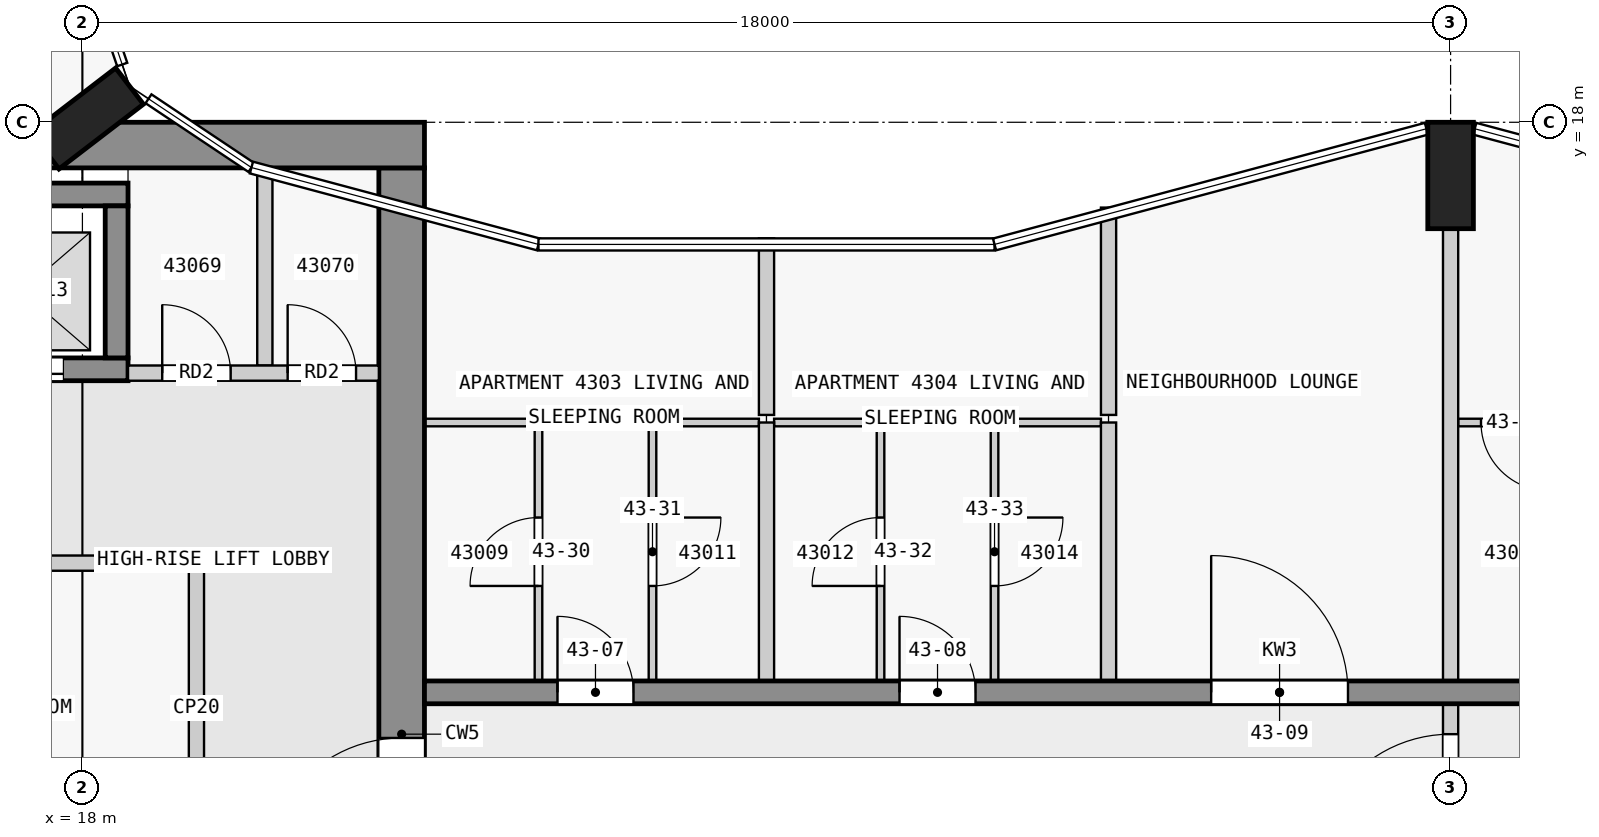
"""IFC4 building model, lengths in metres.
Left out: names, types, materials, properties, quantities, classifications, styles, units other than length and angle.
Written with IfcOpenShell. Run it as: python <this file> out.ifc"""

import sys

from ifc_helpers import new_model, si_unit, direction, frame, frame_2d, origin, origin_2d, place, context, subcontext, project, spatial, rectangle, extrude, element, fill, save


model = new_model("IFC4")
c1 = context("Model", 3, precision=1e-05, world=origin(), true_north=direction((0.0, 1.0)))
c2 = subcontext(c1, "Body", "Model", "MODEL_VIEW")
j1 = project(units=[si_unit("LENGTHUNIT", "METRE"), si_unit("PLANEANGLEUNIT", "RADIAN")], contexts=[c1])
p1 = place(None, origin())
s1 = spatial("IfcSite", under=j1, at=p1, CompositionType="ELEMENT")
p2 = place(p1, origin())
s2 = spatial("IfcBuilding", under=s1, at=p2, CompositionType="ELEMENT")
p3 = place(p2, frame((0.0, 0.0, 167.4)))
s3 = spatial("IfcBuildingStorey", under=s2, at=p3, CompositionType="ELEMENT", Elevation=167.4)
for number, where, z_axis, x_axis in (
    (1, (36.0, 17.3, 0.0), (0.0, 0.0, 1.0), (1.0, 0.0, 0.0)),
    (2, (18.065, 18.05, 0.0), (0.0, 0.0, 1.0), (-0.609, 0.793, 0.0)),
):
    element("IfcColumn", number, at=place(p3, frame(where, z_axis=z_axis, x_axis=x_axis)), inside=s3, PredefinedType="COLUMN", context=c2, shape_type="SweptSolid", body=[
        extrude(rectangle(XDim=0.6, YDim=1.4, at=origin_2d()), origin(), (0.0, 0.0, 1.0), 3.5),
    ])
p4 = place(p3, frame((1.38, 17.7, 0.0), z_axis=(0.0, 0.0, 1.0), x_axis=(1.0, 0.0, 0.0)))
e3 = element("IfcWall", 3, at=p4, inside=s3, PredefinedType="SHEAR", context=c2, shape_type="SweptSolid", body=[
    extrude(rectangle(XDim=21.12, YDim=0.6, at=frame_2d((10.56, 0.0))), origin(), (0.0, 0.0, 1.0), 3.25),
])
p5 = place(p4, frame((6.4, 0.0, 0.0)))
e4 = element("IfcOpeningElement", 4, at=p5, cuts=e3, PredefinedType="OPENING", context=c2, shape_type="SweptSolid", body=[
    extrude(rectangle(XDim=1.8, YDim=2.1, at=frame_2d((0.9, 1.05))), frame((0.0, 0.31, 0.0), z_axis=(0.0, -1.0, 0.0), x_axis=(1.0, 0.0, 0.0)), (0.0, 0.0, 1.0), 0.62),
])
p6 = place(p3, frame((22.2, 2.5, 0.0), z_axis=(0.0, 0.0, 1.0), x_axis=(0.0, 1.0, 0.0)))
e5 = element("IfcWall", 5, at=p6, inside=s3, PredefinedType="SHEAR", context=c2, shape_type="SweptSolid", body=[
    extrude(rectangle(XDim=14.9, YDim=0.6, at=frame_2d((7.45, 0.0))), origin(), (0.0, 0.0, 1.0), 3.25),
])
p7 = place(p6, frame((5.6, 0.0, 0.0)))
e6 = element("IfcOpeningElement", 6, at=p7, cuts=e5, PredefinedType="OPENING", context=c2, shape_type="SweptSolid", body=[
    extrude(rectangle(XDim=1.8, YDim=2.1, at=frame_2d((0.9, 1.05))), frame((0.0, 0.31, 0.0), z_axis=(0.0, -1.0, 0.0), x_axis=(1.0, 0.0, 0.0)), (0.0, 0.0, 1.0), 0.62),
])
p8 = place(p3, frame((10.8, 17.05, 0.0), z_axis=(0.0, 0.0, 1.0), x_axis=(1.0, 0.0, 0.0)))
e7 = element("IfcWall", 7, at=p8, inside=s3, PredefinedType="SHEAR", context=c2, shape_type="SweptSolid", body=[
    extrude(rectangle(XDim=7.8, YDim=0.3, at=frame_2d((3.9, 0.0))), origin(), (0.0, 0.0, 1.0), 3.25),
])
p9 = place(p3, frame((10.8, 14.75, 0.0), z_axis=(0.0, 0.0, 1.0), x_axis=(1.0, 0.0, 0.0)))
e8 = element("IfcWall", 8, at=p9, inside=s3, PredefinedType="SHEAR", context=c2, shape_type="SweptSolid", body=[
    extrude(rectangle(XDim=7.8, YDim=0.3, at=frame_2d((3.9, 0.0))), origin(), (0.0, 0.0, 1.0), 3.25),
])
p10 = place(p9, frame((0.85, 0.0, 0.0)))
e9 = element("IfcOpeningElement", 9, at=p10, cuts=e8, PredefinedType="OPENING", context=c2, shape_type="SweptSolid", body=[
    extrude(rectangle(XDim=1.1, YDim=2.1, at=frame_2d((0.55, 1.05))), frame((0.0, 0.16, 0.0), z_axis=(0.0, -1.0, 0.0), x_axis=(1.0, 0.0, 0.0)), (0.0, 0.0, 1.0), 0.32),
])
p11 = place(p9, frame((3.35, 0.0, 0.0)))
e10 = element("IfcOpeningElement", 10, at=p11, cuts=e8, PredefinedType="OPENING", context=c2, shape_type="SweptSolid", body=[
    extrude(rectangle(XDim=1.1, YDim=2.1, at=frame_2d((0.55, 1.05))), frame((0.0, 0.16, 0.0), z_axis=(0.0, -1.0, 0.0), x_axis=(1.0, 0.0, 0.0)), (0.0, 0.0, 1.0), 0.32),
])
p12 = place(p9, frame((5.85, 0.0, 0.0)))
e11 = element("IfcOpeningElement", 11, at=p12, cuts=e8, PredefinedType="OPENING", context=c2, shape_type="SweptSolid", body=[
    extrude(rectangle(XDim=1.1, YDim=2.1, at=frame_2d((0.55, 1.05))), frame((0.0, 0.16, 0.0), z_axis=(0.0, -1.0, 0.0), x_axis=(1.0, 0.0, 0.0)), (0.0, 0.0, 1.0), 0.32),
])
p13 = place(p3, frame((18.45, 14.9, 0.0), z_axis=(0.0, 0.0, 1.0), x_axis=(0.0, 1.0, 0.0)))
e12 = element("IfcWall", 12, at=p13, inside=s3, PredefinedType="SHEAR", context=c2, shape_type="SweptSolid", body=[
    extrude(rectangle(XDim=2.0, YDim=0.3, at=frame_2d((1.0, 0.0))), origin(), (0.0, 0.0, 1.0), 3.25),
])
p14 = place(p3, frame((22.5, 10.5, 0.0), z_axis=(0.0, 0.0, 1.0), x_axis=(1.0, 0.0, 0.0)))
e13 = element("IfcWall", 13, at=p14, inside=s3, PredefinedType="SHEAR", context=c2, shape_type="SweptSolid", body=[
    extrude(rectangle(XDim=22.5, YDim=0.3, at=frame_2d((11.25, 0.0))), origin(), (0.0, 0.0, 1.0), 3.25),
])
p15 = place(p14, frame((1.75, 0.0, 0.0)))
e14 = element("IfcOpeningElement", 14, at=p15, cuts=e13, PredefinedType="OPENING", context=c2, shape_type="SweptSolid", body=[
    extrude(rectangle(XDim=1.0, YDim=2.1, at=frame_2d((0.5, 1.05))), frame((0.0, 0.16, 0.0), z_axis=(0.0, -1.0, 0.0), x_axis=(1.0, 0.0, 0.0)), (0.0, 0.0, 1.0), 0.32),
])
p16 = place(p14, frame((6.25, 0.0, 0.0)))
e15 = element("IfcOpeningElement", 15, at=p16, cuts=e13, PredefinedType="OPENING", context=c2, shape_type="SweptSolid", body=[
    extrude(rectangle(XDim=1.0, YDim=2.1, at=frame_2d((0.5, 1.05))), frame((0.0, 0.16, 0.0), z_axis=(0.0, -1.0, 0.0), x_axis=(1.0, 0.0, 0.0)), (0.0, 0.0, 1.0), 0.32),
])
p17 = place(p14, frame((10.35, 0.0, 0.0)))
e16 = element("IfcOpeningElement", 16, at=p17, cuts=e13, PredefinedType="OPENING", context=c2, shape_type="SweptSolid", body=[
    extrude(rectangle(XDim=1.8, YDim=2.1, at=frame_2d((0.9, 1.05))), frame((0.0, 0.16, 0.0), z_axis=(0.0, -1.0, 0.0), x_axis=(1.0, 0.0, 0.0)), (0.0, 0.0, 1.0), 0.32),
])
p18 = place(p14, frame((16.85, 0.0, 0.0)))
e17 = element("IfcOpeningElement", 17, at=p18, cuts=e13, PredefinedType="OPENING", context=c2, shape_type="SweptSolid", body=[
    extrude(rectangle(XDim=1.0, YDim=2.1, at=frame_2d((0.5, 1.05))), frame((0.0, 0.16, 0.0), z_axis=(0.0, -1.0, 0.0), x_axis=(1.0, 0.0, 0.0)), (0.0, 0.0, 1.0), 0.32),
])
p19 = place(p3, frame((19.5, 8.4, 0.0), z_axis=(0.0, 0.0, 1.0), x_axis=(0.0, 1.0, 0.0)))
e18 = element("IfcWall", 18, at=p19, inside=s3, PredefinedType="PARTITIONING", context=c2, shape_type="SweptSolid", body=[
    extrude(rectangle(XDim=3.8, YDim=0.2, at=frame_2d((1.9, 0.0))), origin(), (0.0, 0.0, 1.0), 3.25),
])
p20 = place(p3, frame((10.9, 12.2, 0.0), z_axis=(0.0, 0.0, 1.0), x_axis=(1.0, 0.0, 0.0)))
e19 = element("IfcWall", 19, at=p20, inside=s3, PredefinedType="PARTITIONING", context=c2, shape_type="SweptSolid", body=[
    extrude(rectangle(XDim=8.5, YDim=0.2, at=frame_2d((4.25, 0.0))), origin(), (0.0, 0.0, 1.0), 3.25),
])
p21 = place(p20, frame((1.4, 0.0, 0.0)))
e20 = element("IfcOpeningElement", 20, at=p21, cuts=e19, PredefinedType="OPENING", context=c2, shape_type="SweptSolid", body=[
    extrude(rectangle(XDim=0.9, YDim=2.1, at=frame_2d((0.45, 1.05))), frame((0.0, 0.11, 0.0), z_axis=(0.0, -1.0, 0.0), x_axis=(1.0, 0.0, 0.0)), (0.0, 0.0, 1.0), 0.22),
])
p22 = place(p20, frame((5.75, 0.0, 0.0)))
e21 = element("IfcOpeningElement", 21, at=p22, cuts=e19, PredefinedType="OPENING", context=c2, shape_type="SweptSolid", body=[
    extrude(rectangle(XDim=0.9, YDim=2.1, at=frame_2d((0.45, 1.05))), frame((0.0, 0.11, 0.0), z_axis=(0.0, -1.0, 0.0), x_axis=(1.0, 0.0, 0.0)), (0.0, 0.0, 1.0), 0.22),
])
p23 = place(p3, frame((18.6, 14.7, 0.0), z_axis=(0.0, 0.0, 1.0), x_axis=(1.0, 0.0, 0.0)))
e22 = element("IfcWall", 22, at=p23, inside=s3, PredefinedType="PARTITIONING", context=c2, shape_type="SweptSolid", body=[
    extrude(rectangle(XDim=3.3, YDim=0.2, at=frame_2d((1.65, 0.0))), origin(), (0.0, 0.0, 1.0), 3.25),
])
p24 = place(p23, frame((0.45, 0.0, 0.0)))
e23 = element("IfcOpeningElement", 23, at=p24, cuts=e22, PredefinedType="OPENING", context=c2, shape_type="SweptSolid", body=[
    extrude(rectangle(XDim=0.9, YDim=2.1, at=frame_2d((0.45, 1.05))), frame((0.0, 0.11, 0.0), z_axis=(0.0, -1.0, 0.0), x_axis=(1.0, 0.0, 0.0)), (0.0, 0.0, 1.0), 0.22),
])
p25 = place(p23, frame((2.1, 0.0, 0.0)))
e24 = element("IfcOpeningElement", 24, at=p25, cuts=e22, PredefinedType="OPENING", context=c2, shape_type="SweptSolid", body=[
    extrude(rectangle(XDim=0.9, YDim=2.1, at=frame_2d((0.45, 1.05))), frame((0.0, 0.11, 0.0), z_axis=(0.0, -1.0, 0.0), x_axis=(1.0, 0.0, 0.0)), (0.0, 0.0, 1.0), 0.22),
])
p26 = place(p3, frame((20.4, 14.8, 0.0), z_axis=(0.0, 0.0, 1.0), x_axis=(0.0, 1.0, 0.0)))
e25 = element("IfcWall", 25, at=p26, inside=s3, PredefinedType="PARTITIONING", context=c2, shape_type="SweptSolid", body=[
    extrude(rectangle(XDim=2.6, YDim=0.2, at=frame_2d((1.3, 0.0))), origin(), (0.0, 0.0, 1.0), 3.25),
])
p27 = place(p3, frame((23.95, 14.05, 0.0), z_axis=(0.0, 0.0, 1.0), x_axis=(-1.0, 0.0, 0.0)))
e26 = element("IfcWall", 26, at=p27, inside=s3, PredefinedType="PARTITIONING", context=c2, shape_type="SweptSolid", body=[
    extrude(rectangle(XDim=1.45, YDim=0.1, at=frame_2d((0.725, 0.0))), origin(), (0.0, 0.0, 1.0), 3.25),
])
for number, where, z_axis, x_axis in (
    (27, (26.9, 14.05, 0.0), (0.0, 0.0, 1.0), (-1.0, 0.0, 0.0)),
    (28, (28.45, 14.05, 0.0), (0.0, 0.0, 1.0), (-1.0, 0.0, 0.0)),
    (29, (31.4, 14.05, 0.0), (0.0, 0.0, 1.0), (-1.0, 0.0, 0.0)),
):
    element("IfcWall", number, at=place(p3, frame(where, z_axis=z_axis, x_axis=x_axis)), inside=s3, PredefinedType="PARTITIONING", context=c2, shape_type="SweptSolid", body=[
        extrude(rectangle(XDim=1.35, YDim=0.1, at=frame_2d((0.675, 0.0))), origin(), (0.0, 0.0, 1.0), 3.25),
    ])
p28 = place(p3, frame((37.55, 14.05, 0.0), z_axis=(0.0, 0.0, 1.0), x_axis=(-1.0, 0.0, 0.0)))
e30 = element("IfcWall", 30, at=p28, inside=s3, PredefinedType="PARTITIONING", context=c2, shape_type="SweptSolid", body=[
    extrude(rectangle(XDim=1.45, YDim=0.1, at=frame_2d((0.725, 0.0))), origin(), (0.0, 0.0, 1.0), 3.25),
])
p29 = place(p28, frame((0.25, 0.0, 0.0)))
e31 = element("IfcOpeningElement", 31, at=p29, cuts=e30, PredefinedType="OPENING", context=c2, shape_type="SweptSolid", body=[
    extrude(rectangle(XDim=0.9, YDim=2.1, at=frame_2d((0.45, 1.05))), frame((0.0, 0.06, 0.0), z_axis=(0.0, -1.0, 0.0), x_axis=(1.0, 0.0, 0.0)), (0.0, 0.0, 1.0), 0.12),
])
p30 = place(p3, frame((24.0, 10.65, 0.0), z_axis=(0.0, 0.0, 1.0), x_axis=(0.0, 1.0, 0.0)))
e32 = element("IfcWall", 32, at=p30, inside=s3, PredefinedType="PARTITIONING", context=c2, shape_type="SweptSolid", body=[
    extrude(rectangle(XDim=3.4, YDim=0.1, at=frame_2d((1.7, 0.0))), origin(), (0.0, 0.0, 1.0), 3.25),
])
p31 = place(p30, frame((1.25, 0.0, 0.0)))
e33 = element("IfcOpeningElement", 33, at=p31, cuts=e32, PredefinedType="OPENING", context=c2, shape_type="SweptSolid", body=[
    extrude(rectangle(XDim=0.9, YDim=2.1, at=frame_2d((0.45, 1.05))), frame((0.0, 0.06, 0.0), z_axis=(0.0, -1.0, 0.0), x_axis=(1.0, 0.0, 0.0)), (0.0, 0.0, 1.0), 0.12),
])
p32 = place(p3, frame((25.5, 14.05, 0.0), z_axis=(0.0, 0.0, 1.0), x_axis=(0.0, -1.0, 0.0)))
e34 = element("IfcWall", 34, at=p32, inside=s3, PredefinedType="PARTITIONING", context=c2, shape_type="SweptSolid", body=[
    extrude(rectangle(XDim=3.4, YDim=0.1, at=frame_2d((1.7, 0.0))), origin(), (0.0, 0.0, 1.0), 3.25),
])
p33 = place(p32, frame((1.25, 0.0, 0.0)))
e35 = element("IfcOpeningElement", 35, at=p33, cuts=e34, PredefinedType="OPENING", context=c2, shape_type="SweptSolid", body=[
    extrude(rectangle(XDim=0.9, YDim=2.1, at=frame_2d((0.45, 1.05))), frame((0.0, 0.06, 0.0), z_axis=(0.0, -1.0, 0.0), x_axis=(1.0, 0.0, 0.0)), (0.0, 0.0, 1.0), 0.12),
])
p34 = place(p3, frame((27.0, 16.473, 0.0), z_axis=(0.0, 0.0, 1.0), x_axis=(0.0, -1.0, 0.0)))
e36 = element("IfcWall", 36, at=p34, inside=s3, PredefinedType="PARTITIONING", context=c2, shape_type="SweptSolid", body=[
    extrude(rectangle(XDim=2.323, YDim=0.2, at=frame_2d((1.162, 0.0))), origin(), (0.0, 0.0, 1.0), 3.25),
])
p35 = place(p3, frame((27.0, 10.65, 0.0), z_axis=(0.0, 0.0, 1.0), x_axis=(0.0, 1.0, 0.0)))
e37 = element("IfcWall", 37, at=p35, inside=s3, PredefinedType="PARTITIONING", context=c2, shape_type="SweptSolid", body=[
    extrude(rectangle(XDim=3.4, YDim=0.2, at=frame_2d((1.7, 0.0))), origin(), (0.0, 0.0, 1.0), 3.25),
])
p36 = place(p3, frame((28.5, 10.65, 0.0), z_axis=(0.0, 0.0, 1.0), x_axis=(0.0, 1.0, 0.0)))
e38 = element("IfcWall", 38, at=p36, inside=s3, PredefinedType="PARTITIONING", context=c2, shape_type="SweptSolid", body=[
    extrude(rectangle(XDim=3.4, YDim=0.1, at=frame_2d((1.7, 0.0))), origin(), (0.0, 0.0, 1.0), 3.25),
])
p37 = place(p36, frame((1.25, 0.0, 0.0)))
e39 = element("IfcOpeningElement", 39, at=p37, cuts=e38, PredefinedType="OPENING", context=c2, shape_type="SweptSolid", body=[
    extrude(rectangle(XDim=0.9, YDim=2.1, at=frame_2d((0.45, 1.05))), frame((0.0, 0.06, 0.0), z_axis=(0.0, -1.0, 0.0), x_axis=(1.0, 0.0, 0.0)), (0.0, 0.0, 1.0), 0.12),
])
p38 = place(p3, frame((30.0, 14.05, 0.0), z_axis=(0.0, 0.0, 1.0), x_axis=(0.0, -1.0, 0.0)))
e40 = element("IfcWall", 40, at=p38, inside=s3, PredefinedType="PARTITIONING", context=c2, shape_type="SweptSolid", body=[
    extrude(rectangle(XDim=3.4, YDim=0.1, at=frame_2d((1.7, 0.0))), origin(), (0.0, 0.0, 1.0), 3.25),
])
p39 = place(p38, frame((1.25, 0.0, 0.0)))
e41 = element("IfcOpeningElement", 41, at=p39, cuts=e40, PredefinedType="OPENING", context=c2, shape_type="SweptSolid", body=[
    extrude(rectangle(XDim=0.9, YDim=2.1, at=frame_2d((0.45, 1.05))), frame((0.0, 0.06, 0.0), z_axis=(0.0, -1.0, 0.0), x_axis=(1.0, 0.0, 0.0)), (0.0, 0.0, 1.0), 0.12),
])
p40 = place(p3, frame((31.5, 16.878, 0.0), z_axis=(0.0, 0.0, 1.0), x_axis=(0.0, -1.0, 0.0)))
e42 = element("IfcWall", 42, at=p40, inside=s3, PredefinedType="PARTITIONING", context=c2, shape_type="SweptSolid", body=[
    extrude(rectangle(XDim=2.728, YDim=0.2, at=frame_2d((1.364, 0.0))), origin(), (0.0, 0.0, 1.0), 3.25),
])
p41 = place(p3, frame((31.5, 10.65, 0.0), z_axis=(0.0, 0.0, 1.0), x_axis=(0.0, 1.0, 0.0)))
e43 = element("IfcWall", 43, at=p41, inside=s3, PredefinedType="PARTITIONING", context=c2, shape_type="SweptSolid", body=[
    extrude(rectangle(XDim=3.4, YDim=0.2, at=frame_2d((1.7, 0.0))), origin(), (0.0, 0.0, 1.0), 3.25),
])
p42 = place(p3, frame((36.0, 10.65, 0.0), z_axis=(0.0, 0.0, 1.0), x_axis=(0.0, 1.0, 0.0)))
e44 = element("IfcWall", 44, at=p42, inside=s3, PredefinedType="PARTITIONING", context=c2, shape_type="SweptSolid", body=[
    extrude(rectangle(XDim=5.95, YDim=0.2, at=frame_2d((2.975, 0.0))), origin(), (0.0, 0.0, 1.0), 3.25),
])
p43 = place(p3, frame((36.0, 7.45, 0.0), z_axis=(0.0, 0.0, 1.0), x_axis=(0.0, 1.0, 0.0)))
e45 = element("IfcWall", 45, at=p43, inside=s3, PredefinedType="PARTITIONING", context=c2, shape_type="SweptSolid", body=[
    extrude(rectangle(XDim=3.1, YDim=0.2, at=frame_2d((1.55, 0.0))), origin(), (0.0, 0.0, 1.0), 3.25),
])
p44 = place(p43, frame((0.7, 0.0, 0.0)))
e46 = element("IfcOpeningElement", 46, at=p44, cuts=e45, PredefinedType="OPENING", context=c2, shape_type="SweptSolid", body=[
    extrude(rectangle(XDim=1.8, YDim=2.1, at=frame_2d((0.9, 1.05))), frame((0.0, 0.11, 0.0), z_axis=(0.0, -1.0, 0.0), x_axis=(1.0, 0.0, 0.0)), (0.0, 0.0, 1.0), 0.22),
])
p45 = place(p12, origin())
e47 = element("IfcDoor", 47, at=p45, inside=s3, OperationType="DOUBLE_DOOR_SLIDING", PredefinedType="DOOR", context=c2, shape_type="SweptSolid", body=[
    extrude(rectangle(XDim=1.1, YDim=2.1, at=frame_2d((0.55, 1.05))), frame((0.0, 0.025, 0.0), z_axis=(0.0, -1.0, 0.0), x_axis=(1.0, 0.0, 0.0)), (0.0, 0.0, 1.0), 0.05),
])
fill(e11, e47)
p46 = place(p7, origin())
e48 = element("IfcDoor", 48, at=p46, inside=s3, OperationType="DOUBLE_DOOR_SINGLE_SWING", PredefinedType="DOOR", context=c2, shape_type="SweptSolid", body=[
    extrude(rectangle(XDim=1.8, YDim=2.1, at=frame_2d((0.9, 1.05))), frame((0.0, 0.025, 0.0), z_axis=(0.0, -1.0, 0.0), x_axis=(1.0, 0.0, 0.0)), (0.0, 0.0, 1.0), 0.05),
])
fill(e6, e48)
p47 = place(p24, origin())
e49 = element("IfcDoor", 49, at=p47, inside=s3, OperationType="SINGLE_SWING_LEFT", PredefinedType="DOOR", context=c2, shape_type="SweptSolid", body=[
    extrude(rectangle(XDim=0.9, YDim=2.1, at=frame_2d((0.45, 1.05))), frame((0.0, 0.025, 0.0), z_axis=(0.0, -1.0, 0.0), x_axis=(1.0, 0.0, 0.0)), (0.0, 0.0, 1.0), 0.05),
])
fill(e23, e49)
p48 = place(p25, origin())
e50 = element("IfcDoor", 50, at=p48, inside=s3, OperationType="SINGLE_SWING_LEFT", PredefinedType="DOOR", context=c2, shape_type="SweptSolid", body=[
    extrude(rectangle(XDim=0.9, YDim=2.1, at=frame_2d((0.45, 1.05))), frame((0.0, 0.025, 0.0), z_axis=(0.0, -1.0, 0.0), x_axis=(1.0, 0.0, 0.0)), (0.0, 0.0, 1.0), 0.05),
])
fill(e24, e50)
p49 = place(p15, origin())
e51 = element("IfcDoor", 51, at=p49, inside=s3, OperationType="SINGLE_SWING_LEFT", PredefinedType="DOOR", context=c2, shape_type="SweptSolid", body=[
    extrude(rectangle(XDim=1.0, YDim=2.1, at=frame_2d((0.5, 1.05))), frame((0.0, 0.025, 0.0), z_axis=(0.0, -1.0, 0.0), x_axis=(1.0, 0.0, 0.0)), (0.0, 0.0, 1.0), 0.05),
])
fill(e14, e51)
p50 = place(p16, origin())
e52 = element("IfcDoor", 52, at=p50, inside=s3, OperationType="SINGLE_SWING_LEFT", PredefinedType="DOOR", context=c2, shape_type="SweptSolid", body=[
    extrude(rectangle(XDim=1.0, YDim=2.1, at=frame_2d((0.5, 1.05))), frame((0.0, 0.025, 0.0), z_axis=(0.0, -1.0, 0.0), x_axis=(1.0, 0.0, 0.0)), (0.0, 0.0, 1.0), 0.05),
])
fill(e15, e52)
p51 = place(p17, origin())
e53 = element("IfcDoor", 53, at=p51, inside=s3, OperationType="SINGLE_SWING_LEFT", PredefinedType="DOOR", context=c2, shape_type="SweptSolid", body=[
    extrude(rectangle(XDim=1.8, YDim=2.1, at=frame_2d((0.9, 1.05))), frame((0.0, 0.025, 0.0), z_axis=(0.0, -1.0, 0.0), x_axis=(1.0, 0.0, 0.0)), (0.0, 0.0, 1.0), 0.05),
])
fill(e16, e53)
p52 = place(p44, origin())
e54 = element("IfcDoor", 54, at=p52, inside=s3, OperationType="SINGLE_SWING_RIGHT", PredefinedType="DOOR", context=c2, shape_type="SweptSolid", body=[
    extrude(rectangle(XDim=1.8, YDim=2.1, at=frame_2d((0.9, 1.05))), frame((0.0, 0.025, 0.0), z_axis=(0.0, -1.0, 0.0), x_axis=(1.0, 0.0, 0.0)), (0.0, 0.0, 1.0), 0.05),
])
fill(e46, e54)
p53 = place(p31, origin())
e55 = element("IfcDoor", 55, at=p53, inside=s3, OperationType="SINGLE_SWING_LEFT", PredefinedType="DOOR", context=c2, shape_type="SweptSolid", body=[
    extrude(rectangle(XDim=0.9, YDim=2.1, at=frame_2d((0.45, 1.05))), frame((0.0, 0.025, 0.0), z_axis=(0.0, -1.0, 0.0), x_axis=(1.0, 0.0, 0.0)), (0.0, 0.0, 1.0), 0.05),
])
fill(e33, e55)
p54 = place(p33, origin())
e56 = element("IfcDoor", 56, at=p54, inside=s3, OperationType="SINGLE_SWING_LEFT", PredefinedType="DOOR", context=c2, shape_type="SweptSolid", body=[
    extrude(rectangle(XDim=0.9, YDim=2.1, at=frame_2d((0.45, 1.05))), frame((0.0, 0.025, 0.0), z_axis=(0.0, -1.0, 0.0), x_axis=(1.0, 0.0, 0.0)), (0.0, 0.0, 1.0), 0.05),
])
fill(e35, e56)
p55 = place(p37, origin())
e57 = element("IfcDoor", 57, at=p55, inside=s3, OperationType="SINGLE_SWING_LEFT", PredefinedType="DOOR", context=c2, shape_type="SweptSolid", body=[
    extrude(rectangle(XDim=0.9, YDim=2.1, at=frame_2d((0.45, 1.05))), frame((0.0, 0.025, 0.0), z_axis=(0.0, -1.0, 0.0), x_axis=(1.0, 0.0, 0.0)), (0.0, 0.0, 1.0), 0.05),
])
fill(e39, e57)
p56 = place(p39, origin())
e58 = element("IfcDoor", 58, at=p56, inside=s3, OperationType="SINGLE_SWING_LEFT", PredefinedType="DOOR", context=c2, shape_type="SweptSolid", body=[
    extrude(rectangle(XDim=0.9, YDim=2.1, at=frame_2d((0.45, 1.05))), frame((0.0, 0.025, 0.0), z_axis=(0.0, -1.0, 0.0), x_axis=(1.0, 0.0, 0.0)), (0.0, 0.0, 1.0), 0.05),
])
fill(e41, e58)
p57 = place(p29, origin())
e59 = element("IfcDoor", 59, at=p57, inside=s3, OperationType="SINGLE_SWING_LEFT", PredefinedType="DOOR", context=c2, shape_type="SweptSolid", body=[
    extrude(rectangle(XDim=0.9, YDim=2.1, at=frame_2d((0.45, 1.05))), frame((0.0, 0.025, 0.0), z_axis=(0.0, -1.0, 0.0), x_axis=(1.0, 0.0, 0.0)), (0.0, 0.0, 1.0), 0.05),
])
fill(e31, e59)
save(model, sys.argv[1])
